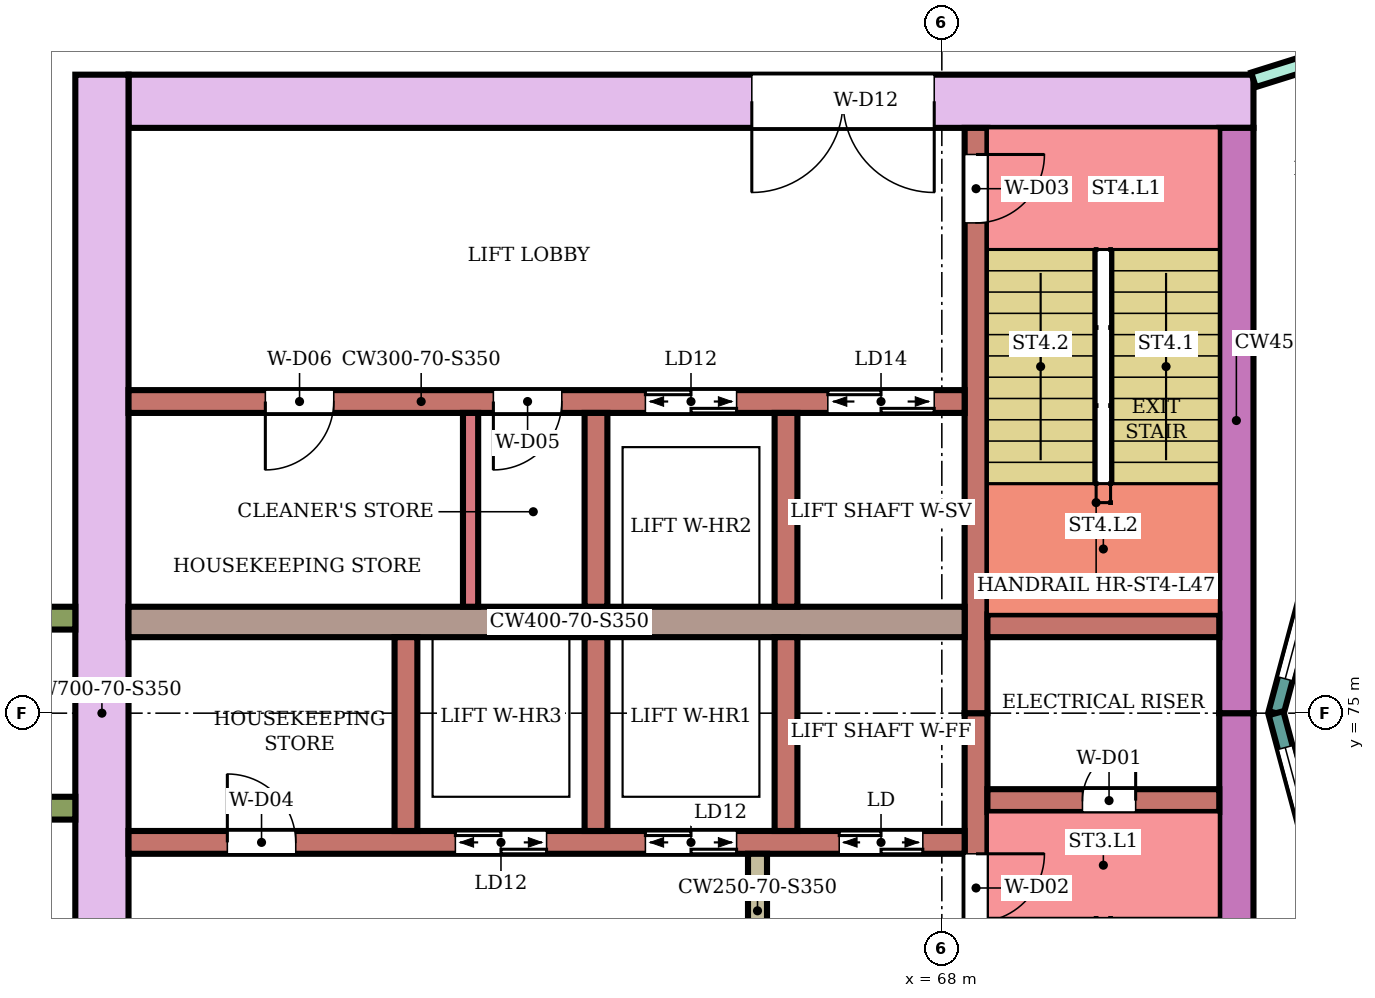
"""IFC4 building model, lengths in metres.
Left out: names, types, materials, properties, quantities, classifications, styles, units other than length and angle.
Written with IfcOpenShell. Run it as: python <this file> out.ifc"""

import sys

from ifc_helpers import new_model, si_unit, direction, frame, frame_2d, origin, place, context, subcontext, project, spatial, rectangle, extrude, element, fill, save


model = new_model("IFC4")
c1 = context("Model", 3, precision=1e-05, world=origin(), true_north=direction((0.0, 1.0)))
c2 = subcontext(c1, "Body", "Model", "MODEL_VIEW")
j1 = project(units=[si_unit("LENGTHUNIT", "METRE"), si_unit("PLANEANGLEUNIT", "RADIAN")], contexts=[c1])
p1 = place(None, origin())
s1 = spatial("IfcSite", under=j1, at=p1, CompositionType="ELEMENT")
p2 = place(p1, origin())
s2 = spatial("IfcBuilding", under=s1, at=p2, CompositionType="ELEMENT")
p3 = place(p2, frame((0.0, 0.0, 202.8)))
s3 = spatial("IfcBuildingStorey", under=s2, at=p3, CompositionType="ELEMENT", Elevation=202.8)
p4 = place(p3, frame((72.1, 83.05, 0.0), z_axis=(0.0, 0.0, 1.0), x_axis=(-1.0, 0.0, 0.0)))
e1 = element("IfcWall", 1, at=p4, inside=s3, PredefinedType="SHEAR", context=c2, shape_type="SweptSolid", body=[
    extrude(rectangle(XDim=14.8, YDim=0.7, at=frame_2d((7.4, 0.0))), origin(), (0.0, 0.0, 1.0), 3.75),
])
p5 = place(p4, frame((4.2, 0.0, 0.0)))
e2 = element("IfcOpeningElement", 2, at=p5, cuts=e1, PredefinedType="OPENING", context=c2, shape_type="SweptSolid", body=[
    extrude(rectangle(XDim=2.4, YDim=2.4, at=frame_2d((1.2, 1.2))), frame((0.0, 0.36, 0.0), z_axis=(0.0, -1.0, 0.0), x_axis=(1.0, 0.0, 0.0)), (0.0, 0.0, 1.0), 0.72),
])
for number, where, z_axis, x_axis in (
    (3, (71.875, 75.0, 0.0), (0.0, 0.0, 1.0), (0.0, -1.0, 0.0)),
    (4, (71.875, 82.7, 0.0), (0.0, 0.0, 1.0), (0.0, -1.0, 0.0)),
):
    element("IfcWall", number, at=place(p3, frame(where, z_axis=z_axis, x_axis=x_axis)), inside=s3, PredefinedType="SHEAR", context=c2, shape_type="SweptSolid", body=[
        extrude(rectangle(XDim=7.7, YDim=0.45, at=frame_2d((3.85, 0.0))), origin(), (0.0, 0.0, 1.0), 3.75),
    ])
p6 = place(p3, frame((56.95, 83.4, 0.0), z_axis=(0.0, 0.0, 1.0), x_axis=(0.0, -1.0, 0.0)))
e5 = element("IfcWall", 5, at=p6, inside=s3, PredefinedType="SHEAR", context=c2, shape_type="SweptSolid", body=[
    extrude(rectangle(XDim=16.8, YDim=0.7, at=frame_2d((8.4, 0.0))), origin(), (0.0, 0.0, 1.0), 3.75),
])
p7 = place(p3, frame((68.45, 75.0, 0.0), z_axis=(0.0, 0.0, 1.0), x_axis=(0.0, -1.0, 0.0)))
e6 = element("IfcWall", 6, at=p7, inside=s3, PredefinedType="SHEAR", context=c2, shape_type="SweptSolid", body=[
    extrude(rectangle(XDim=7.7, YDim=0.3, at=frame_2d((3.85, 0.0))), origin(), (0.0, 0.0, 1.0), 3.75),
])
p8 = place(p7, frame((1.85, 0.0, 0.0)))
e7 = element("IfcOpeningElement", 7, at=p8, cuts=e6, PredefinedType="OPENING", context=c2, shape_type="SweptSolid", body=[
    extrude(rectangle(XDim=0.9, YDim=2.1, at=frame_2d((0.45, 1.05))), frame((0.0, 0.16, 0.0), z_axis=(0.0, -1.0, 0.0), x_axis=(1.0, 0.0, 0.0)), (0.0, 0.0, 1.0), 0.32),
])
p9 = place(p3, frame((68.45, 82.7, 0.0), z_axis=(0.0, 0.0, 1.0), x_axis=(0.0, -1.0, 0.0)))
e8 = element("IfcWall", 8, at=p9, inside=s3, PredefinedType="SHEAR", context=c2, shape_type="SweptSolid", body=[
    extrude(rectangle(XDim=7.7, YDim=0.3, at=frame_2d((3.85, 0.0))), origin(), (0.0, 0.0, 1.0), 3.75),
])
p10 = place(p9, frame((0.35, 0.0, 0.0)))
e9 = element("IfcOpeningElement", 9, at=p10, cuts=e8, PredefinedType="OPENING", context=c2, shape_type="SweptSolid", body=[
    extrude(rectangle(XDim=0.9, YDim=2.1, at=frame_2d((0.45, 1.05))), frame((0.0, 0.16, 0.0), z_axis=(0.0, -1.0, 0.0), x_axis=(1.0, 0.0, 0.0)), (0.0, 0.0, 1.0), 0.32),
])
p11 = place(p3, frame((71.65, 73.85, 0.0), z_axis=(0.0, 0.0, 1.0), x_axis=(-1.0, 0.0, 0.0)))
e10 = element("IfcWall", 10, at=p11, inside=s3, PredefinedType="SHEAR", context=c2, shape_type="SweptSolid", body=[
    extrude(rectangle(XDim=3.05, YDim=0.3, at=frame_2d((1.525, 0.0))), origin(), (0.0, 0.0, 1.0), 3.75),
])
p12 = place(p11, frame((1.1, 0.0, 0.0)))
e11 = element("IfcOpeningElement", 11, at=p12, cuts=e10, PredefinedType="OPENING", context=c2, shape_type="SweptSolid", body=[
    extrude(rectangle(XDim=0.7, YDim=2.0, at=frame_2d((0.35, 1.0))), frame((0.0, 0.16, 0.0), z_axis=(0.0, -1.0, 0.0), x_axis=(1.0, 0.0, 0.0)), (0.0, 0.0, 1.0), 0.32),
])
p13 = place(p3, frame((71.65, 76.15, 0.0), z_axis=(0.0, 0.0, 1.0), x_axis=(-1.0, 0.0, 0.0)))
e12 = element("IfcWall", 12, at=p13, inside=s3, PredefinedType="SHEAR", context=c2, shape_type="SweptSolid", body=[
    extrude(rectangle(XDim=3.05, YDim=0.3, at=frame_2d((1.525, 0.0))), origin(), (0.0, 0.0, 1.0), 3.75),
])
p14 = place(p3, frame((68.3, 73.3, 0.0), z_axis=(0.0, 0.0, 1.0), x_axis=(-1.0, 0.0, 0.0)))
e13 = element("IfcWall", 13, at=p14, inside=s3, PredefinedType="SHEAR", context=c2, shape_type="SweptSolid", body=[
    extrude(rectangle(XDim=11.0, YDim=0.3, at=frame_2d((5.5, 0.0))), origin(), (0.0, 0.0, 1.0), 3.75),
])
p15 = place(p14, frame((0.55, 0.0, 0.0)))
e14 = element("IfcOpeningElement", 14, at=p15, cuts=e13, PredefinedType="OPENING", context=c2, shape_type="SweptSolid", body=[
    extrude(rectangle(XDim=1.1, YDim=2.1, at=frame_2d((0.55, 1.05))), frame((0.0, 0.16, 0.0), z_axis=(0.0, -1.0, 0.0), x_axis=(1.0, 0.0, 0.0)), (0.0, 0.0, 1.0), 0.32),
])
p16 = place(p14, frame((3.0, 0.0, 0.0)))
e15 = element("IfcOpeningElement", 15, at=p16, cuts=e13, PredefinedType="OPENING", context=c2, shape_type="SweptSolid", body=[
    extrude(rectangle(XDim=1.2, YDim=2.1, at=frame_2d((0.6, 1.05))), frame((0.0, 0.16, 0.0), z_axis=(0.0, -1.0, 0.0), x_axis=(1.0, 0.0, 0.0)), (0.0, 0.0, 1.0), 0.32),
])
p17 = place(p14, frame((5.5, 0.0, 0.0)))
e16 = element("IfcOpeningElement", 16, at=p17, cuts=e13, PredefinedType="OPENING", context=c2, shape_type="SweptSolid", body=[
    extrude(rectangle(XDim=1.2, YDim=2.1, at=frame_2d((0.6, 1.05))), frame((0.0, 0.16, 0.0), z_axis=(0.0, -1.0, 0.0), x_axis=(1.0, 0.0, 0.0)), (0.0, 0.0, 1.0), 0.32),
])
p18 = place(p14, frame((8.8, 0.0, 0.0)))
e17 = element("IfcOpeningElement", 17, at=p18, cuts=e13, PredefinedType="OPENING", context=c2, shape_type="SweptSolid", body=[
    extrude(rectangle(XDim=0.9, YDim=2.1, at=frame_2d((0.45, 1.05))), frame((0.0, 0.16, 0.0), z_axis=(0.0, -1.0, 0.0), x_axis=(1.0, 0.0, 0.0)), (0.0, 0.0, 1.0), 0.32),
])
p19 = place(p3, frame((68.3, 76.2, 0.0), z_axis=(0.0, 0.0, 1.0), x_axis=(-1.0, 0.0, 0.0)))
e18 = element("IfcWall", 18, at=p19, inside=s3, PredefinedType="SHEAR", context=c2, shape_type="SweptSolid", body=[
    extrude(rectangle(XDim=11.0, YDim=0.4, at=frame_2d((5.5, 0.0))), origin(), (0.0, 0.0, 1.0), 3.75),
])
p20 = place(p3, frame((68.3, 79.1, 0.0), z_axis=(0.0, 0.0, 1.0), x_axis=(-1.0, 0.0, 0.0)))
e19 = element("IfcWall", 19, at=p20, inside=s3, PredefinedType="SHEAR", context=c2, shape_type="SweptSolid", body=[
    extrude(rectangle(XDim=11.0, YDim=0.3, at=frame_2d((5.5, 0.0))), origin(), (0.0, 0.0, 1.0), 3.75),
])
p21 = place(p20, frame((0.4, 0.0, 0.0)))
e20 = element("IfcOpeningElement", 20, at=p21, cuts=e19, PredefinedType="OPENING", context=c2, shape_type="SweptSolid", body=[
    extrude(rectangle(XDim=1.4, YDim=2.1, at=frame_2d((0.7, 1.05))), frame((0.0, 0.16, 0.0), z_axis=(0.0, -1.0, 0.0), x_axis=(1.0, 0.0, 0.0)), (0.0, 0.0, 1.0), 0.32),
])
p22 = place(p20, frame((3.0, 0.0, 0.0)))
e21 = element("IfcOpeningElement", 21, at=p22, cuts=e19, PredefinedType="OPENING", context=c2, shape_type="SweptSolid", body=[
    extrude(rectangle(XDim=1.2, YDim=2.1, at=frame_2d((0.6, 1.05))), frame((0.0, 0.16, 0.0), z_axis=(0.0, -1.0, 0.0), x_axis=(1.0, 0.0, 0.0)), (0.0, 0.0, 1.0), 0.32),
])
p23 = place(p20, frame((5.3, 0.0, 0.0)))
e22 = element("IfcOpeningElement", 22, at=p23, cuts=e19, PredefinedType="OPENING", context=c2, shape_type="SweptSolid", body=[
    extrude(rectangle(XDim=0.9, YDim=2.1, at=frame_2d((0.45, 1.05))), frame((0.0, 0.16, 0.0), z_axis=(0.0, -1.0, 0.0), x_axis=(1.0, 0.0, 0.0)), (0.0, 0.0, 1.0), 0.32),
])
p24 = place(p20, frame((8.3, 0.0, 0.0)))
e23 = element("IfcOpeningElement", 23, at=p24, cuts=e19, PredefinedType="OPENING", context=c2, shape_type="SweptSolid", body=[
    extrude(rectangle(XDim=0.9, YDim=2.1, at=frame_2d((0.45, 1.05))), frame((0.0, 0.16, 0.0), z_axis=(0.0, -1.0, 0.0), x_axis=(1.0, 0.0, 0.0)), (0.0, 0.0, 1.0), 0.32),
])
for number, where, z_axis, x_axis in (
    (24, (65.95, 76.0, 0.0), (0.0, 0.0, 1.0), (0.0, -1.0, 0.0)),
    (25, (63.45, 76.0, 0.0), (0.0, 0.0, 1.0), (0.0, -1.0, 0.0)),
    (26, (60.95, 76.0, 0.0), (0.0, 0.0, 1.0), (0.0, -1.0, 0.0)),
    (27, (65.95, 78.95, 0.0), (0.0, 0.0, 1.0), (0.0, -1.0, 0.0)),
    (28, (63.45, 78.95, 0.0), (0.0, 0.0, 1.0), (0.0, -1.0, 0.0)),
):
    element("IfcWall", number, at=place(p3, frame(where, z_axis=z_axis, x_axis=x_axis)), inside=s3, PredefinedType="SHEAR", context=c2, shape_type="SweptSolid", body=[
        extrude(rectangle(XDim=2.55, YDim=0.3, at=frame_2d((1.275, 0.0))), origin(), (0.0, 0.0, 1.0), 3.75),
    ])
p25 = place(p3, frame((65.575, 73.15, 0.0), z_axis=(0.0, 0.0, 1.0), x_axis=(0.0, -1.0, 0.0)))
e29 = element("IfcWall", 29, at=p25, inside=s3, PredefinedType="SHEAR", context=c2, shape_type="SweptSolid", body=[
    extrude(rectangle(XDim=1.5, YDim=0.25, at=frame_2d((0.75, 0.0))), origin(), (0.0, 0.0, 1.0), 3.75),
])
for number, where, z_axis, x_axis in (
    (30, (56.6, 76.25, 0.0), (0.0, 0.0, 1.0), (-1.0, 0.0, 0.0)),
    (31, (56.6, 73.75, 0.0), (0.0, 0.0, 1.0), (-1.0, 0.0, 0.0)),
):
    element("IfcWall", number, at=place(p3, frame(where, z_axis=z_axis, x_axis=x_axis)), inside=s3, PredefinedType="NOTDEFINED", context=c2, shape_type="SweptSolid", body=[
        extrude(rectangle(XDim=2.416, YDim=0.3, at=frame_2d((1.208, 0.0))), origin(), (0.0, 0.0, 1.0), 4.1),
    ])
p26 = place(p3, frame((73.415, 78.802, 0.0), z_axis=(0.0, 0.0, 1.0), x_axis=(-0.258789828301, -0.965933654434, 0.0)))
e32 = element("IfcWall", 32, at=p26, inside=s3, PredefinedType="NOTDEFINED", context=c2, shape_type="SweptSolid", body=[
    extrude(rectangle(XDim=3.936, YDim=0.2, at=frame_2d((1.968, 0.0))), origin(), (0.0, 0.0, 1.0), 4.1),
])
p27 = place(p26, frame((0.468, 0.0, 0.9)))
e33 = element("IfcOpeningElement", 33, at=p27, cuts=e32, PredefinedType="OPENING", context=c2, shape_type="SweptSolid", body=[
    extrude(rectangle(XDim=3.0, YDim=2.3, at=frame_2d((1.5, 1.15))), frame((0.0, 0.11, 0.0), z_axis=(0.0, -1.0, 0.0), x_axis=(1.0, 0.0, 0.0)), (0.0, 0.0, 1.0), 0.22),
])
p28 = place(p3, frame((72.396, 75.0, 0.0), z_axis=(0.0, 0.0, 1.0), x_axis=(0.258789828301, -0.965933654434, 0.0)))
e34 = element("IfcWall", 34, at=p28, inside=s3, PredefinedType="NOTDEFINED", context=c2, shape_type="SweptSolid", body=[
    extrude(rectangle(XDim=3.936, YDim=0.2, at=frame_2d((1.968, 0.0))), origin(), (0.0, 0.0, 1.0), 4.1),
])
p29 = place(p28, frame((0.468, 0.0, 0.9)))
e35 = element("IfcOpeningElement", 35, at=p29, cuts=e34, PredefinedType="OPENING", context=c2, shape_type="SweptSolid", body=[
    extrude(rectangle(XDim=3.0, YDim=2.3, at=frame_2d((1.5, 1.15))), frame((0.0, 0.11, 0.0), z_axis=(0.0, -1.0, 0.0), x_axis=(1.0, 0.0, 0.0)), (0.0, 0.0, 1.0), 0.22),
])
p30 = place(p3, frame((72.1, 83.332, 0.0), z_axis=(0.0, 0.0, 1.0), x_axis=(0.954233106619, 0.299063836383, 0.0)))
e36 = element("IfcWall", 36, at=p30, inside=s3, PredefinedType="PARTITIONING", context=c2, shape_type="SweptSolid", body=[
    extrude(rectangle(XDim=2.414, YDim=0.2, at=frame_2d((1.207, 0.0))), origin(), (0.0, 0.0, 1.0), 3.65),
])
p31 = place(p30, frame((0.762, 0.0, 0.0)))
e37 = element("IfcOpeningElement", 37, at=p31, cuts=e36, PredefinedType="OPENING", context=c2, shape_type="SweptSolid", body=[
    extrude(rectangle(XDim=0.9, YDim=2.1, at=frame_2d((0.45, 1.05))), frame((0.0, 0.11, 0.0), z_axis=(0.0, -1.0, 0.0), x_axis=(1.0, 0.0, 0.0)), (0.0, 0.0, 1.0), 0.22),
])
p32 = place(p3, frame((61.8, 78.95, 0.0), z_axis=(0.0, 0.0, 1.0), x_axis=(0.0, -1.0, 0.0)))
e38 = element("IfcWall", 38, at=p32, inside=s3, PredefinedType="PARTITIONING", context=c2, shape_type="SweptSolid", body=[
    extrude(rectangle(XDim=2.55, YDim=0.2, at=frame_2d((1.275, 0.0))), origin(), (0.0, 0.0, 1.0), 3.75),
])
p33 = place(p27, origin())
e39 = element("IfcWindow", 39, at=p33, inside=s3, PartitioningType="SINGLE_PANEL", PredefinedType="WINDOW", context=c2, shape_type="SweptSolid", body=[
    extrude(rectangle(XDim=3.0, YDim=2.3, at=frame_2d((1.5, 1.15))), frame((0.0, 0.03, 0.0), z_axis=(0.0, -1.0, 0.0), x_axis=(1.0, 0.0, 0.0)), (0.0, 0.0, 1.0), 0.06),
])
fill(e33, e39)
p34 = place(p29, origin())
e40 = element("IfcWindow", 40, at=p34, inside=s3, PartitioningType="SINGLE_PANEL", PredefinedType="WINDOW", context=c2, shape_type="SweptSolid", body=[
    extrude(rectangle(XDim=3.0, YDim=2.3, at=frame_2d((1.5, 1.15))), frame((0.0, 0.03, 0.0), z_axis=(0.0, -1.0, 0.0), x_axis=(1.0, 0.0, 0.0)), (0.0, 0.0, 1.0), 0.06),
])
fill(e35, e40)
p35 = place(p12, frame((0.7, 0.0, 0.0), z_axis=(0.0, 0.0, 1.0), x_axis=(-1.0, 0.0, 0.0)))
e41 = element("IfcDoor", 41, at=p35, inside=s3, OperationType="SINGLE_SWING_RIGHT", PredefinedType="DOOR", context=c2, shape_type="SweptSolid", body=[
    extrude(rectangle(XDim=0.7, YDim=2.0, at=frame_2d((0.35, 1.0))), frame((0.0, 0.025, 0.0), z_axis=(0.0, -1.0, 0.0), x_axis=(1.0, 0.0, 0.0)), (0.0, 0.0, 1.0), 0.05),
])
fill(e11, e41)
p36 = place(p8, origin())
e42 = element("IfcDoor", 42, at=p36, inside=s3, OperationType="SINGLE_SWING_LEFT", PredefinedType="DOOR", context=c2, shape_type="SweptSolid", body=[
    extrude(rectangle(XDim=0.9, YDim=2.1, at=frame_2d((0.45, 1.05))), frame((0.0, 0.025, 0.0), z_axis=(0.0, -1.0, 0.0), x_axis=(1.0, 0.0, 0.0)), (0.0, 0.0, 1.0), 0.05),
])
fill(e7, e42)
p37 = place(p10, origin())
e43 = element("IfcDoor", 43, at=p37, inside=s3, OperationType="SINGLE_SWING_LEFT", PredefinedType="DOOR", context=c2, shape_type="SweptSolid", body=[
    extrude(rectangle(XDim=0.9, YDim=2.1, at=frame_2d((0.45, 1.05))), frame((0.0, 0.025, 0.0), z_axis=(0.0, -1.0, 0.0), x_axis=(1.0, 0.0, 0.0)), (0.0, 0.0, 1.0), 0.05),
])
fill(e9, e43)
p38 = place(p15, origin())
e44 = element("IfcDoor", 44, at=p38, inside=s3, OperationType="DOUBLE_DOOR_SLIDING", PredefinedType="DOOR", context=c2, shape_type="SweptSolid", body=[
    extrude(rectangle(XDim=1.1, YDim=2.1, at=frame_2d((0.55, 1.05))), frame((0.0, 0.025, 0.0), z_axis=(0.0, -1.0, 0.0), x_axis=(1.0, 0.0, 0.0)), (0.0, 0.0, 1.0), 0.05),
])
fill(e14, e44)
p39 = place(p16, origin())
e45 = element("IfcDoor", 45, at=p39, inside=s3, OperationType="DOUBLE_DOOR_SLIDING", PredefinedType="DOOR", context=c2, shape_type="SweptSolid", body=[
    extrude(rectangle(XDim=1.2, YDim=2.1, at=frame_2d((0.6, 1.05))), frame((0.0, 0.025, 0.0), z_axis=(0.0, -1.0, 0.0), x_axis=(1.0, 0.0, 0.0)), (0.0, 0.0, 1.0), 0.05),
])
fill(e15, e45)
p40 = place(p17, origin())
e46 = element("IfcDoor", 46, at=p40, inside=s3, OperationType="DOUBLE_DOOR_SLIDING", PredefinedType="DOOR", context=c2, shape_type="SweptSolid", body=[
    extrude(rectangle(XDim=1.2, YDim=2.1, at=frame_2d((0.6, 1.05))), frame((0.0, 0.025, 0.0), z_axis=(0.0, -1.0, 0.0), x_axis=(1.0, 0.0, 0.0)), (0.0, 0.0, 1.0), 0.05),
])
fill(e16, e46)
p41 = place(p18, frame((0.9, 0.0, 0.0), z_axis=(0.0, 0.0, 1.0), x_axis=(-1.0, 0.0, 0.0)))
e47 = element("IfcDoor", 47, at=p41, inside=s3, OperationType="SINGLE_SWING_LEFT", PredefinedType="DOOR", context=c2, shape_type="SweptSolid", body=[
    extrude(rectangle(XDim=0.9, YDim=2.1, at=frame_2d((0.45, 1.05))), frame((0.0, 0.025, 0.0), z_axis=(0.0, -1.0, 0.0), x_axis=(1.0, 0.0, 0.0)), (0.0, 0.0, 1.0), 0.05),
])
fill(e17, e47)
p42 = place(p21, origin())
e48 = element("IfcDoor", 48, at=p42, inside=s3, OperationType="DOUBLE_DOOR_SLIDING", PredefinedType="DOOR", context=c2, shape_type="SweptSolid", body=[
    extrude(rectangle(XDim=1.4, YDim=2.1, at=frame_2d((0.7, 1.05))), frame((0.0, 0.025, 0.0), z_axis=(0.0, -1.0, 0.0), x_axis=(1.0, 0.0, 0.0)), (0.0, 0.0, 1.0), 0.05),
])
fill(e20, e48)
p43 = place(p22, origin())
e49 = element("IfcDoor", 49, at=p43, inside=s3, OperationType="DOUBLE_DOOR_SLIDING", PredefinedType="DOOR", context=c2, shape_type="SweptSolid", body=[
    extrude(rectangle(XDim=1.2, YDim=2.1, at=frame_2d((0.6, 1.05))), frame((0.0, 0.025, 0.0), z_axis=(0.0, -1.0, 0.0), x_axis=(1.0, 0.0, 0.0)), (0.0, 0.0, 1.0), 0.05),
])
fill(e21, e49)
p44 = place(p23, origin())
e50 = element("IfcDoor", 50, at=p44, inside=s3, OperationType="SINGLE_SWING_RIGHT", PredefinedType="DOOR", context=c2, shape_type="SweptSolid", body=[
    extrude(rectangle(XDim=0.9, YDim=2.1, at=frame_2d((0.45, 1.05))), frame((0.0, 0.025, 0.0), z_axis=(0.0, -1.0, 0.0), x_axis=(1.0, 0.0, 0.0)), (0.0, 0.0, 1.0), 0.05),
])
fill(e22, e50)
p45 = place(p24, origin())
e51 = element("IfcDoor", 51, at=p45, inside=s3, OperationType="SINGLE_SWING_RIGHT", PredefinedType="DOOR", context=c2, shape_type="SweptSolid", body=[
    extrude(rectangle(XDim=0.9, YDim=2.1, at=frame_2d((0.45, 1.05))), frame((0.0, 0.025, 0.0), z_axis=(0.0, -1.0, 0.0), x_axis=(1.0, 0.0, 0.0)), (0.0, 0.0, 1.0), 0.05),
])
fill(e23, e51)
p46 = place(p5, origin())
e52 = element("IfcDoor", 52, at=p46, inside=s3, OperationType="DOUBLE_DOOR_SINGLE_SWING", PredefinedType="DOOR", context=c2, shape_type="SweptSolid", body=[
    extrude(rectangle(XDim=2.4, YDim=2.4, at=frame_2d((1.2, 1.2))), frame((0.0, 0.025, 0.0), z_axis=(0.0, -1.0, 0.0), x_axis=(1.0, 0.0, 0.0)), (0.0, 0.0, 1.0), 0.05),
])
fill(e2, e52)
save(model, sys.argv[1])
